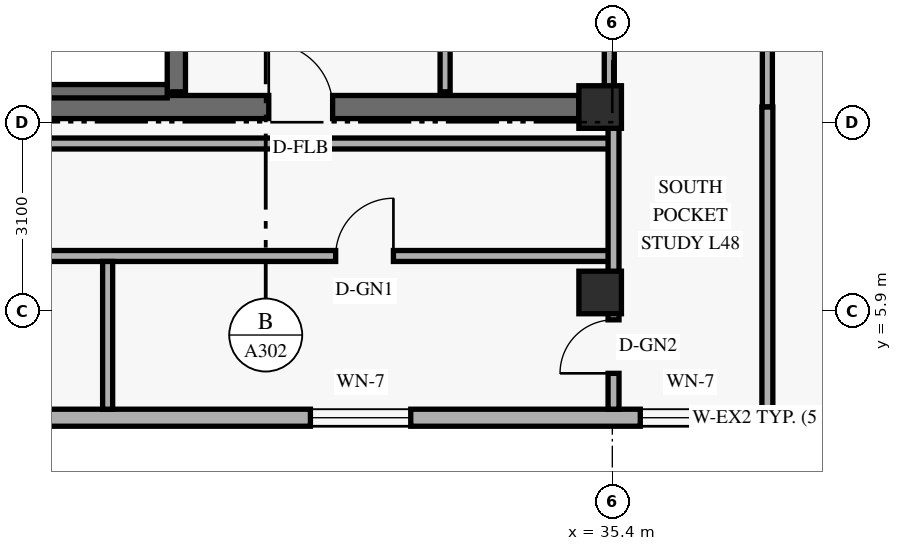
"""IFC4 building model, lengths in metres.
Left out: names, types, materials, properties, quantities, classifications, styles, units other than length and angle.
Written with IfcOpenShell. Run it as: python <this file> out.ifc"""

import sys

from ifc_helpers import new_model, si_unit, direction, frame, frame_2d, origin, origin_2d, place, context, subcontext, project, spatial, rectangle, extrude, element, fill, save


model = new_model("IFC4")
c1 = context("Model", 3, precision=1e-05, world=origin(), true_north=direction((0.0, 1.0)))
c2 = subcontext(c1, "Body", "Model", "MODEL_VIEW")
j1 = project(units=[si_unit("LENGTHUNIT", "METRE"), si_unit("PLANEANGLEUNIT", "RADIAN")], contexts=[c1])
p1 = place(None, origin())
s1 = spatial("IfcSite", under=j1, at=p1, CompositionType="ELEMENT")
p2 = place(p1, origin())
s2 = spatial("IfcBuilding", under=s1, at=p2, CompositionType="ELEMENT")
p3 = place(p2, frame((0.0, 0.0, 184.8)))
s3 = spatial("IfcBuildingStorey", under=s2, at=p3, CompositionType="ELEMENT", Elevation=184.8)
p4 = place(p3, frame((24.55, 9.25, 0.0), z_axis=(0.0, 0.0, 1.0), x_axis=(1.0, 0.0, 0.0)))
e1 = element("IfcWall", 1, at=p4, inside=s3, PredefinedType="SHEAR", context=c2, shape_type="SweptSolid", body=[
    extrude(rectangle(XDim=10.3, YDim=0.38, at=frame_2d((5.15, 0.0))), origin(), (0.0, 0.0, 1.0), 3.36),
])
p5 = place(p4, frame((5.2, 0.0, 0.0)))
e2 = element("IfcOpeningElement", 2, at=p5, cuts=e1, PredefinedType="OPENING", context=c2, shape_type="SweptSolid", body=[
    extrude(rectangle(XDim=1.05, YDim=2.15, at=frame_2d((0.525, 1.075))), frame((0.0, 0.2, 0.0), z_axis=(0.0, -1.0, 0.0), x_axis=(1.0, 0.0, 0.0)), (0.0, 0.0, 1.0), 0.4),
])
p6 = place(p3, frame((28.23, 9.5, 0.0), z_axis=(0.0, 0.0, 1.0), x_axis=(0.0, 1.0, 0.0)))
e3 = element("IfcWall", 3, at=p6, inside=s3, PredefinedType="SHEAR", context=c2, shape_type="SweptSolid", body=[
    extrude(rectangle(XDim=7.76, YDim=0.3, at=frame_2d((3.88, 0.0))), origin(), (0.0, 0.0, 1.0), 3.36),
])
p7 = place(p3, frame((24.92, 9.51, 0.0), z_axis=(0.0, 0.0, 1.0), x_axis=(1.0, 0.0, 0.0)))
e4 = element("IfcWall", 4, at=p7, inside=s3, PredefinedType="SHEAR", context=c2, shape_type="SweptSolid", body=[
    extrude(rectangle(XDim=3.16, YDim=0.22, at=frame_2d((1.58, 0.0))), origin(), (0.0, 0.0, 1.0), 3.36),
])
for number, where, z_axis, x_axis in (
    (5, (35.2, 6.2, 0.0), (0.0, 0.0, 1.0), (1.0, 0.0, 0.0)),
    (6, (35.2, 9.25, 0.0), (0.0, 0.0, 1.0), (1.0, 0.0, 0.0)),
):
    element("IfcColumn", number, at=place(p3, frame(where, z_axis=z_axis, x_axis=x_axis)), inside=s3, PredefinedType="COLUMN", context=c2, shape_type="SweptSolid", body=[
        extrude(rectangle(XDim=0.7, YDim=0.7, at=origin_2d()), origin(), (0.0, 0.0, 1.0), 3.6),
    ])
p8 = place(p3, frame((21.22, 4.14, 0.0), z_axis=(0.0, 0.0, 1.0), x_axis=(1.0, 0.0, 0.0)))
e7 = element("IfcWall", 7, at=p8, inside=s3, PredefinedType="SOLIDWALL", context=c2, shape_type="SweptSolid", body=[
    extrude(rectangle(XDim=33.76, YDim=0.28, at=frame_2d((16.88, 0.0))), origin(), (0.0, 0.0, 1.0), 3.36),
])
p9 = place(p8, frame((2.33, 0.0, 0.85)))
e8 = element("IfcOpeningElement", 8, at=p9, cuts=e7, PredefinedType="OPENING", context=c2, shape_type="SweptSolid", body=[
    extrude(rectangle(XDim=1.65, YDim=1.6, at=frame_2d((0.825, 0.8))), frame((0.0, 0.15, 0.0), z_axis=(0.0, -1.0, 0.0), x_axis=(1.0, 0.0, 0.0)), (0.0, 0.0, 1.0), 0.3),
])
p10 = place(p8, frame((9.215, 0.0, 0.85)))
e9 = element("IfcOpeningElement", 9, at=p10, cuts=e7, PredefinedType="OPENING", context=c2, shape_type="SweptSolid", body=[
    extrude(rectangle(XDim=1.65, YDim=1.6, at=frame_2d((0.825, 0.8))), frame((0.0, 0.15, 0.0), z_axis=(0.0, -1.0, 0.0), x_axis=(1.0, 0.0, 0.0)), (0.0, 0.0, 1.0), 0.3),
])
p11 = place(p8, frame((14.64, 0.0, 0.85)))
e10 = element("IfcOpeningElement", 10, at=p11, cuts=e7, PredefinedType="OPENING", context=c2, shape_type="SweptSolid", body=[
    extrude(rectangle(XDim=1.65, YDim=1.6, at=frame_2d((0.825, 0.8))), frame((0.0, 0.15, 0.0), z_axis=(0.0, -1.0, 0.0), x_axis=(1.0, 0.0, 0.0)), (0.0, 0.0, 1.0), 0.3),
])
p12 = place(p8, frame((20.489, 0.0, 0.85)))
e11 = element("IfcOpeningElement", 11, at=p12, cuts=e7, PredefinedType="OPENING", context=c2, shape_type="SweptSolid", body=[
    extrude(rectangle(XDim=1.65, YDim=1.6, at=frame_2d((0.825, 0.8))), frame((0.0, 0.15, 0.0), z_axis=(0.0, -1.0, 0.0), x_axis=(1.0, 0.0, 0.0)), (0.0, 0.0, 1.0), 0.3),
])
p13 = place(p8, frame((26.197, 0.0, 0.85)))
e12 = element("IfcOpeningElement", 12, at=p13, cuts=e7, PredefinedType="OPENING", context=c2, shape_type="SweptSolid", body=[
    extrude(rectangle(XDim=1.2, YDim=1.5, at=frame_2d((0.6, 0.75))), frame((0.0, 0.15, 0.0), z_axis=(0.0, -1.0, 0.0), x_axis=(1.0, 0.0, 0.0)), (0.0, 0.0, 1.0), 0.3),
])
p14 = place(p8, frame((29.904, 0.0, 0.85)))
e13 = element("IfcOpeningElement", 13, at=p14, cuts=e7, PredefinedType="OPENING", context=c2, shape_type="SweptSolid", body=[
    extrude(rectangle(XDim=1.65, YDim=1.6, at=frame_2d((0.825, 0.8))), frame((0.0, 0.15, 0.0), z_axis=(0.0, -1.0, 0.0), x_axis=(1.0, 0.0, 0.0)), (0.0, 0.0, 1.0), 0.3),
])
p15 = place(p3, frame((32.65, 9.5, 0.0), z_axis=(0.0, 0.0, 1.0), x_axis=(0.0, 1.0, 0.0)))
e14 = element("IfcWall", 14, at=p15, inside=s3, PredefinedType="PARTITIONING", context=c2, shape_type="SweptSolid", body=[
    extrude(rectangle(XDim=6.08, YDim=0.165, at=frame_2d((3.04, 0.0))), origin(), (0.0, 0.0, 1.0), 3.36),
])
p16 = place(p3, frame((37.95, 9.25, 0.0), z_axis=(0.0, 0.0, 1.0), x_axis=(0.0, 1.0, 0.0)))
e15 = element("IfcWall", 15, at=p16, inside=s3, PredefinedType="PARTITIONING", context=c2, shape_type="SweptSolid", body=[
    extrude(rectangle(XDim=6.248, YDim=0.165, at=frame_2d((3.124, 0.0))), origin(), (0.0, 0.0, 1.0), 2.73),
])
p17 = place(p3, frame((35.35, 9.5, 0.0), z_axis=(0.0, 0.0, 1.0), x_axis=(0.0, 1.0, 0.0)))
e16 = element("IfcWall", 16, at=p17, inside=s3, PredefinedType="PARTITIONING", context=c2, shape_type="SweptSolid", body=[
    extrude(rectangle(XDim=5.998, YDim=0.165, at=frame_2d((2.999, 0.0))), origin(), (0.0, 0.0, 1.0), 2.73),
])
p18 = place(p3, frame((21.74, 6.8, 0.0), z_axis=(0.0, 0.0, 1.0), x_axis=(1.0, 0.0, 0.0)))
e17 = element("IfcWall", 17, at=p18, inside=s3, PredefinedType="STANDARD", context=c2, shape_type="SweptSolid", body=[
    extrude(rectangle(XDim=13.68, YDim=0.18, at=frame_2d((6.84, 0.0))), origin(), (0.0, 0.0, 1.0), 2.73),
])
p19 = place(p18, frame((0.97, 0.0, 0.0)))
e18 = element("IfcOpeningElement", 18, at=p19, cuts=e17, PredefinedType="OPENING", context=c2, shape_type="SweptSolid", body=[
    extrude(rectangle(XDim=0.95, YDim=2.15, at=frame_2d((0.475, 1.075))), frame((0.0, 0.1, 0.0), z_axis=(0.0, -1.0, 0.0), x_axis=(1.0, 0.0, 0.0)), (0.0, 0.0, 1.0), 0.2),
])
p20 = place(p18, frame((9.11, 0.0, 0.0)))
e19 = element("IfcOpeningElement", 19, at=p20, cuts=e17, PredefinedType="OPENING", context=c2, shape_type="SweptSolid", body=[
    extrude(rectangle(XDim=0.95, YDim=2.15, at=frame_2d((0.475, 1.075))), frame((0.0, 0.1, 0.0), z_axis=(0.0, -1.0, 0.0), x_axis=(1.0, 0.0, 0.0)), (0.0, 0.0, 1.0), 0.2),
])
p21 = place(p3, frame((23.85, 8.65, 0.0), z_axis=(0.0, 0.0, 1.0), x_axis=(1.0, 0.0, 0.0)))
e20 = element("IfcWall", 20, at=p21, inside=s3, PredefinedType="STANDARD", context=c2, shape_type="SweptSolid", body=[
    extrude(rectangle(XDim=11.57, YDim=0.18, at=frame_2d((5.785, 0.0))), origin(), (0.0, 0.0, 1.0), 2.73),
])
p22 = place(p3, frame((35.42, 4.28, 0.0), z_axis=(0.0, 0.0, 1.0), x_axis=(0.0, 1.0, 0.0)))
e21 = element("IfcWall", 21, at=p22, inside=s3, PredefinedType="PARTITIONING", context=c2, shape_type="SweptSolid", body=[
    extrude(rectangle(XDim=4.97, YDim=0.18, at=frame_2d((2.485, 0.0))), origin(), (0.0, 0.0, 1.0), 2.73),
])
p23 = place(p22, frame((0.59, 0.0, 0.0)))
e22 = element("IfcOpeningElement", 22, at=p23, cuts=e21, PredefinedType="OPENING", context=c2, shape_type="SweptSolid", body=[
    extrude(rectangle(XDim=0.88, YDim=2.12, at=frame_2d((0.44, 1.06))), frame((0.0, 0.1, 0.0), z_axis=(0.0, -1.0, 0.0), x_axis=(1.0, 0.0, 0.0)), (0.0, 0.0, 1.0), 0.2),
])
p24 = place(p3, frame((37.95, 4.28, 0.0), z_axis=(0.0, 0.0, 1.0), x_axis=(0.0, 1.0, 0.0)))
e23 = element("IfcWall", 23, at=p24, inside=s3, PredefinedType="PARTITIONING", context=c2, shape_type="SweptSolid", body=[
    extrude(rectangle(XDim=4.97, YDim=0.18, at=frame_2d((2.485, 0.0))), origin(), (0.0, 0.0, 1.0), 2.73),
])
p25 = place(p3, frame((27.1, 4.28, 0.0), z_axis=(0.0, 0.0, 1.0), x_axis=(0.0, 1.0, 0.0)))
e24 = element("IfcWall", 24, at=p25, inside=s3, PredefinedType="PARTITIONING", context=c2, shape_type="SweptSolid", body=[
    extrude(rectangle(XDim=2.43, YDim=0.165, at=frame_2d((1.215, 0.0))), origin(), (0.0, 0.0, 1.0), 2.879),
])
p26 = place(p10, origin())
e25 = element("IfcWindow", 25, at=p26, inside=s3, PartitioningType="SINGLE_PANEL", PredefinedType="WINDOW", context=c2, shape_type="SweptSolid", body=[
    extrude(rectangle(XDim=1.65, YDim=1.6, at=frame_2d((0.825, 0.8))), frame((0.0, 0.03, 0.0), z_axis=(0.0, -1.0, 0.0), x_axis=(1.0, 0.0, 0.0)), (0.0, 0.0, 1.0), 0.06),
])
fill(e9, e25)
p27 = place(p11, origin())
e26 = element("IfcWindow", 26, at=p27, inside=s3, PartitioningType="SINGLE_PANEL", PredefinedType="WINDOW", context=c2, shape_type="SweptSolid", body=[
    extrude(rectangle(XDim=1.65, YDim=1.6, at=frame_2d((0.825, 0.8))), frame((0.0, 0.03, 0.0), z_axis=(0.0, -1.0, 0.0), x_axis=(1.0, 0.0, 0.0)), (0.0, 0.0, 1.0), 0.06),
])
fill(e10, e26)
p28 = place(p5, origin())
e27 = element("IfcDoor", 27, at=p28, inside=s3, OperationType="SINGLE_SWING_LEFT", PredefinedType="DOOR", context=c2, shape_type="SweptSolid", body=[
    extrude(rectangle(XDim=1.05, YDim=2.15, at=frame_2d((0.525, 1.075))), frame((0.0, 0.025, 0.0), z_axis=(0.0, -1.0, 0.0), x_axis=(1.0, 0.0, 0.0)), (0.0, 0.0, 1.0), 0.05),
])
fill(e2, e27)
p29 = place(p23, origin())
e28 = element("IfcDoor", 28, at=p29, inside=s3, OperationType="SINGLE_SWING_LEFT", PredefinedType="DOOR", context=c2, shape_type="SweptSolid", body=[
    extrude(rectangle(XDim=0.88, YDim=2.12, at=frame_2d((0.44, 1.06))), frame((0.0, 0.025, 0.0), z_axis=(0.0, -1.0, 0.0), x_axis=(1.0, 0.0, 0.0)), (0.0, 0.0, 1.0), 0.05),
])
fill(e22, e28)
p30 = place(p20, origin())
e29 = element("IfcDoor", 29, at=p30, inside=s3, OperationType="SINGLE_SWING_RIGHT", PredefinedType="DOOR", context=c2, shape_type="SweptSolid", body=[
    extrude(rectangle(XDim=0.95, YDim=2.15, at=frame_2d((0.475, 1.075))), frame((0.0, 0.025, 0.0), z_axis=(0.0, -1.0, 0.0), x_axis=(1.0, 0.0, 0.0)), (0.0, 0.0, 1.0), 0.05),
])
fill(e19, e29)
save(model, sys.argv[1])
